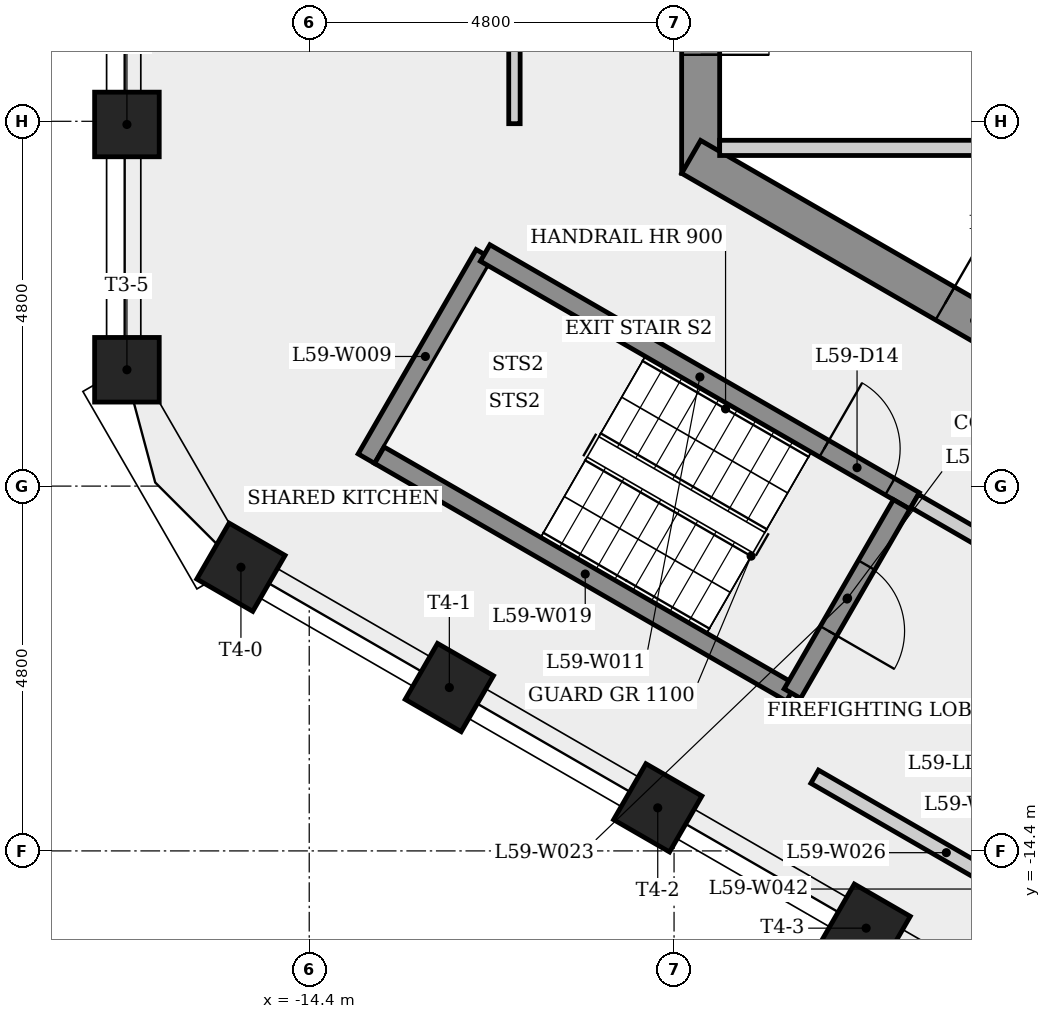
"""IFC4 building model, lengths in metres.
Left out: names, types, materials, properties, quantities, classifications, styles, units other than length and angle.
Written with IfcOpenShell. Run it as: python <this file> out.ifc"""

import sys

from ifc_helpers import new_model, si_unit, direction, frame, frame_2d, origin, origin_2d, place, context, subcontext, project, spatial, rectangle, extrude, element, fill, save


model = new_model("IFC4")
c1 = context("Model", 3, precision=1e-05, world=origin(), true_north=direction((0.0, 1.0)))
c2 = subcontext(c1, "Body", "Model", "MODEL_VIEW")
j1 = project(units=[si_unit("LENGTHUNIT", "METRE"), si_unit("PLANEANGLEUNIT", "RADIAN")], contexts=[c1])
p1 = place(None, origin())
s1 = spatial("IfcSite", under=j1, at=p1, CompositionType="ELEMENT")
p2 = place(p1, origin())
s2 = spatial("IfcBuilding", under=s1, at=p2, CompositionType="ELEMENT")
p3 = place(p2, frame((0.0, 0.0, 222.3)))
s3 = spatial("IfcBuildingStorey", under=s2, at=p3, CompositionType="ELEMENT", Elevation=222.3)
p4 = place(p3, frame((-9.25, 5.485, 0.0), z_axis=(0.0, 0.0, 1.0), x_axis=(0.0, -1.0, 0.0)))
e1 = element("IfcWall", 1, at=p4, inside=s3, PredefinedType="SHEAR", context=c2, shape_type="SweptSolid", body=[
    extrude(rectangle(XDim=10.97, YDim=0.5, at=frame_2d((5.485, 0.0))), origin(), (0.0, 0.0, 1.0), 3.4),
])
p5 = place(p4, frame((8.51, 0.0, 0.0)))
e2 = element("IfcOpeningElement", 2, at=p5, cuts=e1, PredefinedType="OPENING", context=c2, shape_type="SweptSolid", body=[
    extrude(rectangle(XDim=0.9, YDim=2.1, at=frame_2d((0.45, 1.05))), frame((0.0, 0.26, 0.0), z_axis=(0.0, -1.0, 0.0), x_axis=(1.0, 0.0, 0.0)), (0.0, 0.0, 1.0), 0.52),
])
p6 = place(p4, frame((4.685, 0.0, 0.0)))
e3 = element("IfcOpeningElement", 3, at=p6, cuts=e1, PredefinedType="OPENING", context=c2, shape_type="SweptSolid", body=[
    extrude(rectangle(XDim=1.6, YDim=2.1, at=frame_2d((0.8, 1.05))), frame((0.0, 0.26, 0.0), z_axis=(0.0, -1.0, 0.0), x_axis=(1.0, 0.0, 0.0)), (0.0, 0.0, 1.0), 0.52),
])
p7 = place(p3, frame((-9.375, -5.268, 0.0), z_axis=(0.0, 0.0, 1.0), x_axis=(0.866023993627, -0.500002442456, 0.0)))
e4 = element("IfcWall", 4, at=p7, inside=s3, PredefinedType="SHEAR", context=c2, shape_type="SweptSolid", body=[
    extrude(rectangle(XDim=10.97, YDim=0.5, at=frame_2d((5.485, 0.0))), origin(), (0.0, 0.0, 1.0), 3.4),
])
p8 = place(p7, frame((3.857, 0.0, 0.0)))
e5 = element("IfcOpeningElement", 5, at=p8, cuts=e4, PredefinedType="OPENING", context=c2, shape_type="SweptSolid", body=[
    extrude(rectangle(XDim=0.9, YDim=2.1, at=frame_2d((0.45, 1.05))), frame((0.0, 0.26, 0.0), z_axis=(0.0, -1.0, 0.0), x_axis=(1.0, 0.0, 0.0)), (0.0, 0.0, 1.0), 0.52),
])
p9 = place(p7, frame((9.076, 0.0, 0.0)))
e6 = element("IfcOpeningElement", 6, at=p9, cuts=e4, PredefinedType="OPENING", context=c2, shape_type="SweptSolid", body=[
    extrude(rectangle(XDim=0.9, YDim=2.1, at=frame_2d((0.45, 1.05))), frame((0.0, 0.26, 0.0), z_axis=(0.0, -1.0, 0.0), x_axis=(1.0, 0.0, 0.0)), (0.0, 0.0, 1.0), 0.52),
])
for number, where, z_axis, x_axis in (
    (7, (-16.799, -4.842, 0.0), (0.0, 0.0, 1.0), (-1.0, 0.0, 0.0)),
    (8, (-16.799, -8.069, 0.0), (0.0, 0.0, 1.0), (-1.0, 0.0, 0.0)),
    (9, (-15.299, -10.667, 0.0), (0.0, 0.0, 1.0), (-0.5, -0.866, 0.0)),
    (10, (-12.557, -12.25, 0.0), (0.0, 0.0, 1.0), (-0.5, -0.866, 0.0)),
    (11, (-9.815, -13.833, 0.0), (0.0, 0.0, 1.0), (-0.5, -0.866, 0.0)),
    (12, (-7.073, -15.417, 0.0), (0.0, 0.0, 1.0), (-0.5, -0.866, 0.0)),
):
    element("IfcColumn", number, at=place(p3, frame(where, z_axis=z_axis, x_axis=x_axis)), inside=s3, PredefinedType="COLUMN", context=c2, shape_type="SweptSolid", body=[
        extrude(rectangle(XDim=0.85, YDim=0.85, at=origin_2d()), origin(), (0.0, 0.0, 1.0), 3.4),
    ])
p10 = place(p3, frame((-13.648, -9.239, 0.0), z_axis=(0.0, 0.0, 1.0), x_axis=(0.500003782172, 0.866023220135, 0.0)))
e13 = element("IfcWall", 13, at=p10, inside=s3, PredefinedType="SHEAR", context=c2, shape_type="SweptSolid", body=[
    extrude(rectangle(XDim=3.105, YDim=0.25, at=frame_2d((1.552, 0.0))), origin(), (0.0, 0.0, 1.0), 3.05),
])
p11 = place(p3, frame((-12.085, -6.532, 0.0), z_axis=(0.0, 0.0, 1.0), x_axis=(0.866031063448, -0.499990197047, 0.0)))
e14 = element("IfcWall", 14, at=p11, inside=s3, PredefinedType="SHEAR", context=c2, shape_type="SweptSolid", body=[
    extrude(rectangle(XDim=6.525, YDim=0.25, at=frame_2d((3.263, 0.0))), origin(), (0.0, 0.0, 1.0), 3.05),
])
p12 = place(p11, frame((5.15, 0.0, 0.0)))
e15 = element("IfcOpeningElement", 15, at=p12, cuts=e14, PredefinedType="OPENING", context=c2, shape_type="SweptSolid", body=[
    extrude(rectangle(XDim=1.0, YDim=2.1, at=frame_2d((0.5, 1.05))), frame((0.0, 0.135, 0.0), z_axis=(0.0, -1.0, 0.0), x_axis=(1.0, 0.0, 0.0)), (0.0, 0.0, 1.0), 0.27),
])
p13 = place(p3, frame((-11.7, -4.831, 0.0), z_axis=(0.0, 0.0, 1.0), x_axis=(0.0, 1.0, 0.0)))
e16 = element("IfcWall", 16, at=p13, inside=s3, PredefinedType="PARTITIONING", context=c2, shape_type="SweptSolid", body=[
    extrude(rectangle(XDim=9.738, YDim=0.15, at=frame_2d((4.869, 0.0))), origin(), (0.0, 0.0, 1.0), 3.05),
])
p14 = place(p13, frame((7.552, 0.0, 0.0)))
e17 = element("IfcOpeningElement", 17, at=p14, cuts=e16, PredefinedType="OPENING", context=c2, shape_type="SweptSolid", body=[
    extrude(rectangle(XDim=1.0, YDim=2.1, at=frame_2d((0.5, 1.05))), frame((0.0, 0.085, 0.0), z_axis=(0.0, -1.0, 0.0), x_axis=(1.0, 0.0, 0.0)), (0.0, 0.0, 1.0), 0.17),
])
p15 = place(p13, frame((2.72, 0.0, 0.0)))
e18 = element("IfcOpeningElement", 18, at=p15, cuts=e16, PredefinedType="OPENING", context=c2, shape_type="SweptSolid", body=[
    extrude(rectangle(XDim=1.0, YDim=2.1, at=frame_2d((0.5, 1.05))), frame((0.0, 0.085, 0.0), z_axis=(0.0, -1.0, 0.0), x_axis=(1.0, 0.0, 0.0)), (0.0, 0.0, 1.0), 0.17),
])
p16 = place(p3, frame((-9.0, -5.15, 0.0), z_axis=(0.0, 0.0, 1.0), x_axis=(1.0, 0.0, 0.0)))
e19 = element("IfcWall", 19, at=p16, inside=s3, PredefinedType="PARTITIONING", context=c2, shape_type="SweptSolid", body=[
    extrude(rectangle(XDim=11.325, YDim=0.2, at=frame_2d((5.663, 0.0))), origin(), (0.0, 0.0, 1.0), 3.05),
])
p17 = place(p3, frame((-8.06, -12.321, 0.0), z_axis=(0.0, 0.0, 1.0), x_axis=(-0.866029591389, 0.499992746786, 0.0)))
e20 = element("IfcWall", 20, at=p17, inside=s3, PredefinedType="SHEAR", context=c2, shape_type="SweptSolid", body=[
    extrude(rectangle(XDim=6.255, YDim=0.25, at=frame_2d((3.127, 0.0))), origin(), (0.0, 0.0, 1.0), 3.05),
])
p18 = place(p3, frame((-6.605, -9.841, 0.0), z_axis=(0.0, 0.0, 1.0), x_axis=(-0.500011588718, -0.866018712932, 0.0)))
e21 = element("IfcWall", 21, at=p18, inside=s3, PredefinedType="SHEAR", context=c2, shape_type="SweptSolid", body=[
    extrude(rectangle(XDim=2.875, YDim=0.25, at=frame_2d((1.438, 0.0))), origin(), (0.0, 0.0, 1.0), 3.05),
])
p19 = place(p18, frame((0.923, 0.0, 0.0)))
e22 = element("IfcOpeningElement", 22, at=p19, cuts=e21, PredefinedType="OPENING", context=c2, shape_type="SweptSolid", body=[
    extrude(rectangle(XDim=1.0, YDim=2.1, at=frame_2d((0.5, 1.05))), frame((0.0, 0.135, 0.0), z_axis=(0.0, -1.0, 0.0), x_axis=(1.0, 0.0, 0.0)), (0.0, 0.0, 1.0), 0.27),
])
p20 = place(p3, frame((-6.435, -9.795, 0.0), z_axis=(0.0, 0.0, 1.0), x_axis=(0.866012907634, -0.500021643343, 0.0)))
e23 = element("IfcWall", 23, at=p20, inside=s3, PredefinedType="PARTITIONING", context=c2, shape_type="SweptSolid", body=[
    extrude(rectangle(XDim=4.45, YDim=0.2, at=frame_2d((2.225, 0.0))), origin(), (0.0, 0.0, 1.0), 3.05),
])
p21 = place(p20, frame((1.675, 0.0, 0.0)))
e24 = element("IfcOpeningElement", 24, at=p21, cuts=e23, PredefinedType="OPENING", context=c2, shape_type="SweptSolid", body=[
    extrude(rectangle(XDim=1.1, YDim=2.1, at=frame_2d((0.55, 1.05))), frame((0.0, 0.11, 0.0), z_axis=(0.0, -1.0, 0.0), x_axis=(1.0, 0.0, 0.0)), (0.0, 0.0, 1.0), 0.22),
])
p22 = place(p3, frame((-4.286, -15.423, 0.0), z_axis=(0.0, 0.0, 1.0), x_axis=(-0.866026010844, 0.49999894854, 0.0)))
e25 = element("IfcWall", 25, at=p22, inside=s3, PredefinedType="PARTITIONING", context=c2, shape_type="SweptSolid", body=[
    extrude(rectangle(XDim=4.0, YDim=0.2, at=frame_2d((2.0, 0.0))), origin(), (0.0, 0.0, 1.0), 3.05),
])
p23 = place(p12, origin())
e26 = element("IfcDoor", 26, at=p23, inside=s3, OperationType="SINGLE_SWING_LEFT", PredefinedType="DOOR", context=c2, shape_type="SweptSolid", body=[
    extrude(rectangle(XDim=1.0, YDim=2.1, at=frame_2d((0.5, 1.05))), frame((0.0, 0.025, 0.0), z_axis=(0.0, -1.0, 0.0), x_axis=(1.0, 0.0, 0.0)), (0.0, 0.0, 1.0), 0.05),
])
fill(e15, e26)
p24 = place(p19, origin())
e27 = element("IfcDoor", 27, at=p24, inside=s3, OperationType="SINGLE_SWING_RIGHT", PredefinedType="DOOR", context=c2, shape_type="SweptSolid", body=[
    extrude(rectangle(XDim=1.0, YDim=2.1, at=frame_2d((0.5, 1.05))), frame((0.0, 0.025, 0.0), z_axis=(0.0, -1.0, 0.0), x_axis=(1.0, 0.0, 0.0)), (0.0, 0.0, 1.0), 0.05),
])
fill(e22, e27)
p25 = place(p8, origin())
e28 = element("IfcDoor", 28, at=p25, inside=s3, OperationType="SINGLE_SWING_LEFT", PredefinedType="DOOR", context=c2, shape_type="SweptSolid", body=[
    extrude(rectangle(XDim=0.9, YDim=2.1, at=frame_2d((0.45, 1.05))), frame((0.0, 0.025, 0.0), z_axis=(0.0, -1.0, 0.0), x_axis=(1.0, 0.0, 0.0)), (0.0, 0.0, 1.0), 0.05),
])
fill(e5, e28)
p26 = place(p5, origin())
e29 = element("IfcDoor", 29, at=p26, inside=s3, OperationType="SINGLE_SWING_RIGHT", PredefinedType="DOOR", context=c2, shape_type="SweptSolid", body=[
    extrude(rectangle(XDim=0.9, YDim=2.1, at=frame_2d((0.45, 1.05))), frame((0.0, 0.025, 0.0), z_axis=(0.0, -1.0, 0.0), x_axis=(1.0, 0.0, 0.0)), (0.0, 0.0, 1.0), 0.05),
])
fill(e2, e29)
save(model, sys.argv[1])
